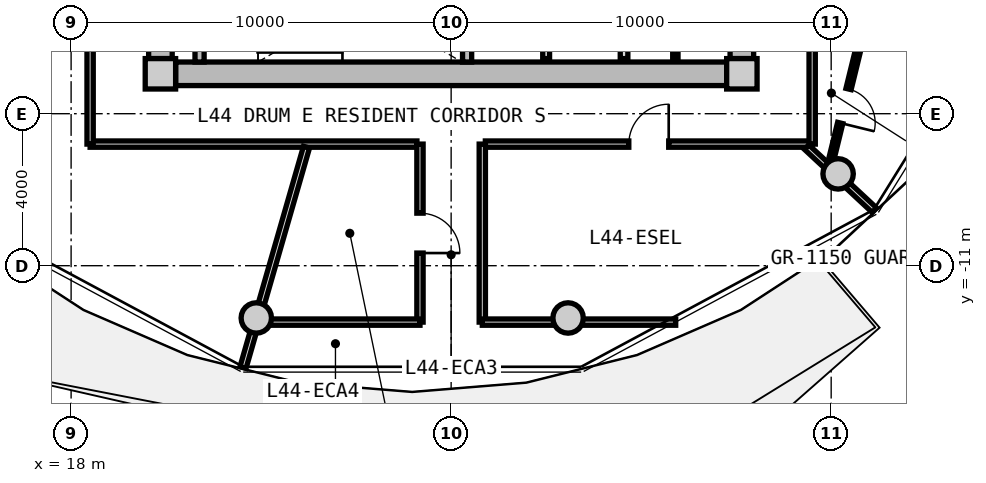
"""IFC4 building model, lengths in metres.
Left out: names, types, materials, properties, quantities, classifications, styles, units other than length and angle.
Written with IfcOpenShell. Run it as: python <this file> out.ifc"""

import sys

from ifc_helpers import new_model, si_unit, direction, frame, frame_2d, origin, origin_2d, place, context, subcontext, project, spatial, rectangle, circle, extrude, source, transform, mapped, element, fill, save


model = new_model("IFC4")
c1 = context("Model", 3, precision=1e-05, world=origin(), true_north=direction((0.0, 1.0)))
c2 = subcontext(c1, "Body", "Model", "MODEL_VIEW")
j1 = project(units=[si_unit("LENGTHUNIT", "METRE"), si_unit("PLANEANGLEUNIT", "RADIAN")], contexts=[c1])
p1 = place(None, origin())
s1 = spatial("IfcSite", under=j1, at=p1, CompositionType="ELEMENT")
p2 = place(p1, origin())
s2 = spatial("IfcBuilding", under=s1, at=p2, CompositionType="ELEMENT")
p3 = place(p2, frame((0.0, 0.0, 143.45)))
s3 = spatial("IfcBuildingStorey", under=s2, at=p3, CompositionType="ELEMENT", Elevation=143.45)
m1 = source(origin(), c2, "Body", "SweptSolid", [
    extrude(rectangle(XDim=0.8, YDim=0.8, at=origin_2d()), origin(), (0.0, 0.0, 1.0), 3.05),
])
for number, where, z_axis, x_axis in (
    (1, (20.35, -5.95, 0.0), (0.0, 0.0, 1.0), (1.0, 0.0, 0.0)),
    (2, (35.65, -5.95, 0.0), (0.0, 0.0, 1.0), (1.0, 0.0, 0.0)),
):
    element("IfcColumn", number, at=place(p3, frame(where, z_axis=z_axis, x_axis=x_axis)), inside=s3, PredefinedType="COLUMN", context=c2, shape_type="MappedRepresentation", body=[
        mapped(m1, transform((0.0, 0.0, 0.0), x_axis=(1.0, 0.0, 0.0), y_axis=(0.0, 1.0, 0.0), z_axis=(0.0, 0.0, 1.0), scale=1.0)),
    ])
m2 = source(origin(), c2, "Body", "SweptSolid", [
    extrude(rectangle(XDim=14.5, YDim=0.62, at=frame_2d((7.25, 0.0))), origin(), (0.0, 0.0, 1.0), 2.81),
])
p4 = place(p3, frame((35.25, -5.95, 0.0), z_axis=(0.0, 0.0, 1.0), x_axis=(-1.0, 0.0, 0.0)))
e3 = element("IfcWall", 3, at=p4, inside=s3, PredefinedType="SHEAR", context=c2, shape_type="MappedRepresentation", body=[
    mapped(m2, transform((0.0, 0.0, 0.0), x_axis=(1.0, 0.0, 0.0), y_axis=(0.0, 1.0, 0.0), z_axis=(0.0, 0.0, 1.0), scale=1.0)),
])
m3 = source(origin(), c2, "Body", "SweptSolid", [
    extrude(rectangle(XDim=11.1, YDim=0.62, at=frame_2d((5.55, 0.0))), origin(), (0.0, 0.0, 1.0), 2.81),
])
p5 = place(p3, frame((20.35, -5.55, 0.0), z_axis=(0.0, 0.0, 1.0), x_axis=(0.0, 1.0, 0.0)))
e4 = element("IfcWall", 4, at=p5, inside=s3, PredefinedType="SHEAR", context=c2, shape_type="MappedRepresentation", body=[
    mapped(m3, transform((0.0, 0.0, 0.0), x_axis=(1.0, 0.0, 0.0), y_axis=(0.0, 1.0, 0.0), z_axis=(0.0, 0.0, 1.0), scale=1.0)),
])
p6 = place(p5, frame((3.8, 0.0, 0.0)))
e5 = element("IfcOpeningElement", 5, at=p6, cuts=e4, PredefinedType="OPENING", context=c2, shape_type="SweptSolid", body=[
    extrude(rectangle(XDim=1.2, YDim=2.15, at=frame_2d((0.6, 1.075))), frame((0.0, 0.32, 0.0), z_axis=(0.0, -1.0, 0.0), x_axis=(1.0, 0.0, 0.0)), (0.0, 0.0, 1.0), 0.64),
])
p7 = place(p3, frame((35.65, 5.55, 0.0), z_axis=(0.0, 0.0, 1.0), x_axis=(0.0, -1.0, 0.0)))
e6 = element("IfcWall", 6, at=p7, inside=s3, PredefinedType="SHEAR", context=c2, shape_type="MappedRepresentation", body=[
    mapped(m3, transform((0.0, 0.0, 0.0), x_axis=(1.0, 0.0, 0.0), y_axis=(0.0, 1.0, 0.0), z_axis=(0.0, 0.0, 1.0), scale=1.0)),
])
p8 = place(p7, frame((5.65, 0.0, 0.0)))
e7 = element("IfcOpeningElement", 7, at=p8, cuts=e6, PredefinedType="OPENING", context=c2, shape_type="SweptSolid", body=[
    extrude(rectangle(XDim=1.2, YDim=2.15, at=frame_2d((0.6, 1.075))), frame((0.0, 0.32, 0.0), z_axis=(0.0, -1.0, 0.0), x_axis=(1.0, 0.0, 0.0)), (0.0, 0.0, 1.0), 0.64),
])
m4 = source(origin(), c2, "Body", "SweptSolid", [
    extrude(circle(Radius=0.4, at=origin_2d()), origin(), (0.0, 0.0, 1.0), 3.05),
])
for number, where, z_axis, x_axis in (
    (8, (22.873, -12.375, 0.0), (0.0, 0.0, 1.0), (1.0, 0.0, 0.0)),
    (9, (31.077, -12.375, 0.0), (0.0, 0.0, 1.0), (1.0, 0.0, 0.0)),
    (10, (38.183, -8.584, 0.0), (0.0, 0.0, 1.0), (1.0, 0.0, 0.0)),
):
    element("IfcColumn", number, at=place(p3, frame(where, z_axis=z_axis, x_axis=x_axis)), inside=s3, PredefinedType="COLUMN", context=c2, shape_type="MappedRepresentation", body=[
        mapped(m4, transform((0.0, 0.0, 0.0), x_axis=(1.0, 0.0, 0.0), y_axis=(0.0, 1.0, 0.0), z_axis=(0.0, 0.0, 1.0), scale=1.0)),
    ])
m5 = source(origin(), c2, "Body", "SweptSolid", [
    extrude(rectangle(XDim=3.19, YDim=0.24, at=frame_2d((1.595, 0.0))), origin(), (0.0, 0.0, 1.0), 2.81),
])
for number, where, z_axis, x_axis in (
    (11, (21.38, -5.64, 0.0), (0.0, 0.0, 1.0), (0.0, 1.0, 0.0)),
    (12, (28.42, -5.64, 0.0), (0.0, 0.0, 1.0), (0.0, 1.0, 0.0)),
):
    element("IfcWall", number, at=place(p3, frame(where, z_axis=z_axis, x_axis=x_axis)), inside=s3, PredefinedType="PARTITIONING", context=c2, shape_type="MappedRepresentation", body=[
        mapped(m5, transform((0.0, 0.0, 0.0), x_axis=(1.0, 0.0, 0.0), y_axis=(0.0, 1.0, 0.0), z_axis=(0.0, 0.0, 1.0), scale=1.0)),
    ])
m6 = source(origin(), c2, "Body", "SweptSolid", [
    extrude(rectangle(XDim=3.8, YDim=0.2, at=frame_2d((1.9, 0.0))), origin(), (0.0, 0.0, 1.0), 2.795),
])
p9 = place(p3, frame((32.55, -5.55, 0.0), z_axis=(0.0, 0.0, 1.0), x_axis=(0.0, 1.0, 0.0)))
e13 = element("IfcWall", 13, at=p9, inside=s3, PredefinedType="PARTITIONING", context=c2, shape_type="MappedRepresentation", body=[
    mapped(m6, transform((0.0, 0.0, 0.0), x_axis=(1.0, 0.0, 0.0), y_axis=(0.0, 1.0, 0.0), z_axis=(0.0, 0.0, 1.0), scale=1.0)),
])
m7 = source(origin(), c2, "Body", "SweptSolid", [
    extrude(rectangle(XDim=3.22, YDim=0.18, at=frame_2d((1.61, 0.0))), origin(), (0.0, 0.0, 1.0), 2.795),
])
p10 = place(p3, frame((30.5, -5.55, 0.0), z_axis=(0.0, 0.0, 1.0), x_axis=(0.0, 1.0, 0.0)))
e14 = element("IfcWall", 14, at=p10, inside=s3, PredefinedType="PARTITIONING", context=c2, shape_type="MappedRepresentation", body=[
    mapped(m7, transform((0.0, 0.0, 0.0), x_axis=(1.0, 0.0, 0.0), y_axis=(0.0, 1.0, 0.0), z_axis=(0.0, 0.0, 1.0), scale=1.0)),
])
m8 = source(origin(), c2, "Body", "SweptSolid", [
    extrude(rectangle(XDim=3.8, YDim=0.14, at=frame_2d((1.9, 0.0))), origin(), (0.0, 0.0, 1.0), 2.795),
])
p11 = place(p3, frame((33.9, -5.55, 0.0), z_axis=(0.0, 0.0, 1.0), x_axis=(0.0, 1.0, 0.0)))
e15 = element("IfcWall", 15, at=p11, inside=s3, PredefinedType="PARTITIONING", context=c2, shape_type="MappedRepresentation", body=[
    mapped(m8, transform((0.0, 0.0, 0.0), x_axis=(1.0, 0.0, 0.0), y_axis=(0.0, 1.0, 0.0), z_axis=(0.0, 0.0, 1.0), scale=1.0)),
])
m9 = source(origin(), c2, "Body", "SweptSolid", [
    extrude(rectangle(XDim=8.6, YDim=0.165, at=frame_2d((4.3, 0.0))), origin(), (0.0, 0.0, 1.0), 2.795),
])
p12 = place(p3, frame((37.5, -7.8, 0.0), z_axis=(0.0, 0.0, 1.0), x_axis=(-1.0, 0.0, 0.0)))
e16 = element("IfcWall", 16, at=p12, inside=s3, PredefinedType="PARTITIONING", context=c2, shape_type="MappedRepresentation", body=[
    mapped(m9, transform((0.0, 0.0, 0.0), x_axis=(1.0, 0.0, 0.0), y_axis=(0.0, 1.0, 0.0), z_axis=(0.0, 0.0, 1.0), scale=1.0)),
])
p13 = place(p12, frame((3.775, 0.0, 0.0)))
e17 = element("IfcOpeningElement", 17, at=p13, cuts=e16, PredefinedType="OPENING", context=c2, shape_type="SweptSolid", body=[
    extrude(rectangle(XDim=1.05, YDim=2.15, at=frame_2d((0.525, 1.075))), frame((0.0, 0.093, 0.0), z_axis=(0.0, -1.0, 0.0), x_axis=(1.0, 0.0, 0.0)), (0.0, 0.0, 1.0), 0.185),
])
p14 = place(p3, frame((27.1, -7.8, 0.0), z_axis=(0.0, 0.0, 1.0), x_axis=(-1.0, 0.0, 0.0)))
e18 = element("IfcWall", 18, at=p14, inside=s3, PredefinedType="PARTITIONING", context=c2, shape_type="MappedRepresentation", body=[
    mapped(m9, transform((0.0, 0.0, 0.0), x_axis=(1.0, 0.0, 0.0), y_axis=(0.0, 1.0, 0.0), z_axis=(0.0, 0.0, 1.0), scale=1.0)),
])
m10 = source(origin(), c2, "Body", "SweptSolid", [
    extrude(rectangle(XDim=15.6, YDim=0.165, at=frame_2d((7.8, 0.0))), origin(), (0.0, 0.0, 1.0), 2.795),
])
p15 = place(p3, frame((18.5, -7.8, 0.0), z_axis=(0.0, 0.0, 1.0), x_axis=(0.0, 1.0, 0.0)))
e19 = element("IfcWall", 19, at=p15, inside=s3, PredefinedType="PARTITIONING", context=c2, shape_type="MappedRepresentation", body=[
    mapped(m10, transform((0.0, 0.0, 0.0), x_axis=(1.0, 0.0, 0.0), y_axis=(0.0, 1.0, 0.0), z_axis=(0.0, 0.0, 1.0), scale=1.0)),
])
p16 = place(p15, frame((7.175, 0.0, 0.0)))
e20 = element("IfcOpeningElement", 20, at=p16, cuts=e19, PredefinedType="OPENING", context=c2, shape_type="SweptSolid", body=[
    extrude(rectangle(XDim=1.25, YDim=2.2, at=frame_2d((0.625, 1.1))), frame((0.0, 0.093, 0.0), z_axis=(0.0, -1.0, 0.0), x_axis=(1.0, 0.0, 0.0)), (0.0, 0.0, 1.0), 0.185),
])
p17 = place(p3, frame((37.5, 7.8, 0.0), z_axis=(0.0, 0.0, 1.0), x_axis=(0.0, -1.0, 0.0)))
e21 = element("IfcWall", 21, at=p17, inside=s3, PredefinedType="PARTITIONING", context=c2, shape_type="MappedRepresentation", body=[
    mapped(m10, transform((0.0, 0.0, 0.0), x_axis=(1.0, 0.0, 0.0), y_axis=(0.0, 1.0, 0.0), z_axis=(0.0, 0.0, 1.0), scale=1.0)),
])
p18 = place(p17, frame((5.687, 0.0, 0.0)))
e22 = element("IfcOpeningElement", 22, at=p18, cuts=e21, PredefinedType="OPENING", context=c2, shape_type="SweptSolid", body=[
    extrude(rectangle(XDim=1.05, YDim=2.15, at=frame_2d((0.525, 1.075))), frame((0.0, 0.093, 0.0), z_axis=(0.0, -1.0, 0.0), x_axis=(1.0, 0.0, 0.0)), (0.0, 0.0, 1.0), 0.185),
])
m11 = source(origin(), c2, "Body", "SweptSolid", [
    extrude(rectangle(XDim=6.035, YDim=0.165, at=frame_2d((3.018, 0.0))), origin(), (0.0, 0.0, 1.0), 2.435),
])
p19 = place(p3, frame((24.194, -7.88, 0.0), z_axis=(0.0, 0.0, 1.0), x_axis=(-0.276809454862, -0.960924828329, 0.0)))
e23 = element("IfcWall", 23, at=p19, inside=s3, PredefinedType="PARTITIONING", context=c2, shape_type="MappedRepresentation", body=[
    mapped(m11, transform((0.0, 0.0, 0.0), x_axis=(1.0, 0.0, 0.0), y_axis=(0.0, 1.0, 0.0), z_axis=(0.0, 0.0, 1.0), scale=1.0)),
])
m12 = source(origin(), c2, "Body", "SweptSolid", [
    extrude(rectangle(XDim=2.435, YDim=0.165, at=frame_2d((1.217, 0.0))), origin(), (0.0, 0.0, 1.0), 2.345),
])
p20 = place(p3, frame((37.354, -7.88, 0.0), z_axis=(0.0, 0.0, 1.0), x_axis=(0.732164643118, -0.681127693878, 0.0)))
e24 = element("IfcWall", 24, at=p20, inside=s3, PredefinedType="PARTITIONING", context=c2, shape_type="MappedRepresentation", body=[
    mapped(m12, transform((0.0, 0.0, 0.0), x_axis=(1.0, 0.0, 0.0), y_axis=(0.0, 1.0, 0.0), z_axis=(0.0, 0.0, 1.0), scale=1.0)),
])
m13 = source(origin(), c2, "Body", "SweptSolid", [
    extrude(rectangle(XDim=4.685, YDim=0.165, at=frame_2d((2.342, 0.0))), origin(), (0.0, 0.0, 1.0), 2.795),
])
p21 = place(p3, frame((27.18, -12.485, 0.0), z_axis=(0.0, 0.0, 1.0), x_axis=(0.0, 1.0, 0.0)))
e25 = element("IfcWall", 25, at=p21, inside=s3, PredefinedType="PARTITIONING", context=c2, shape_type="MappedRepresentation", body=[
    mapped(m13, transform((0.0, 0.0, 0.0), x_axis=(1.0, 0.0, 0.0), y_axis=(0.0, 1.0, 0.0), z_axis=(0.0, 0.0, 1.0), scale=1.0)),
])
p22 = place(p21, frame((1.817, 0.0, 0.0)))
e26 = element("IfcOpeningElement", 26, at=p22, cuts=e25, PredefinedType="OPENING", context=c2, shape_type="SweptSolid", body=[
    extrude(rectangle(XDim=1.05, YDim=2.15, at=frame_2d((0.525, 1.075))), frame((0.0, 0.093, 0.0), z_axis=(0.0, -1.0, 0.0), x_axis=(1.0, 0.0, 0.0)), (0.0, 0.0, 1.0), 0.185),
])
m14 = source(origin(), c2, "Body", "SweptSolid", [
    extrude(rectangle(XDim=4.469, YDim=0.165, at=frame_2d((2.234, 0.0))), origin(), (0.0, 0.0, 1.0), 2.345),
])
p23 = place(p3, frame((22.711, -12.485, 0.0), z_axis=(0.0, 0.0, 1.0), x_axis=(1.0, 0.0, 0.0)))
e27 = element("IfcWall", 27, at=p23, inside=s3, PredefinedType="PARTITIONING", context=c2, shape_type="MappedRepresentation", body=[
    mapped(m14, transform((0.0, 0.0, 0.0), x_axis=(1.0, 0.0, 0.0), y_axis=(0.0, 1.0, 0.0), z_axis=(0.0, 0.0, 1.0), scale=1.0)),
])
p24 = place(p3, frame((28.82, -12.485, 0.0), z_axis=(0.0, 0.0, 1.0), x_axis=(0.0, 1.0, 0.0)))
e28 = element("IfcWall", 28, at=p24, inside=s3, PredefinedType="PARTITIONING", context=c2, shape_type="MappedRepresentation", body=[
    mapped(m13, transform((0.0, 0.0, 0.0), x_axis=(1.0, 0.0, 0.0), y_axis=(0.0, 1.0, 0.0), z_axis=(0.0, 0.0, 1.0), scale=1.0)),
])
m15 = source(origin(), c2, "Body", "SweptSolid", [
    extrude(rectangle(XDim=5.089, YDim=0.165, at=frame_2d((2.544, 0.0))), origin(), (0.0, 0.0, 1.0), 2.345),
])
p25 = place(p3, frame((28.82, -12.485, 0.0), z_axis=(0.0, 0.0, 1.0), x_axis=(1.0, 0.0, 0.0)))
e29 = element("IfcWall", 29, at=p25, inside=s3, PredefinedType="PARTITIONING", context=c2, shape_type="MappedRepresentation", body=[
    mapped(m15, transform((0.0, 0.0, 0.0), x_axis=(1.0, 0.0, 0.0), y_axis=(0.0, 1.0, 0.0), z_axis=(0.0, 0.0, 1.0), scale=1.0)),
])
m16 = source(origin(), c2, "Body", "SweptSolid", [
    extrude(rectangle(XDim=3.464, YDim=0.14, at=frame_2d((1.732, 0.0))), origin(), (0.0, 0.0, 1.0), 2.795),
])
p26 = place(p3, frame((38.76, -5.115, 0.0), z_axis=(0.0, 0.0, 1.0), x_axis=(-0.238055968485, -0.971251438027, 0.0)))
e30 = element("IfcWall", 30, at=p26, inside=s3, PredefinedType="PARTITIONING", context=c2, shape_type="MappedRepresentation", body=[
    mapped(m16, transform((0.0, 0.0, 0.0), x_axis=(1.0, 0.0, 0.0), y_axis=(0.0, 1.0, 0.0), z_axis=(0.0, 0.0, 1.0), scale=1.0)),
])
p27 = place(p26, frame((1.272, 0.0, 0.0)))
e31 = element("IfcOpeningElement", 31, at=p27, cuts=e30, PredefinedType="OPENING", context=c2, shape_type="SweptSolid", body=[
    extrude(rectangle(XDim=0.92, YDim=2.1, at=frame_2d((0.46, 1.05))), frame((0.0, 0.08, 0.0), z_axis=(0.0, -1.0, 0.0), x_axis=(1.0, 0.0, 0.0)), (0.0, 0.0, 1.0), 0.16),
])
m17 = source(origin(), c2, "Body", "SweptSolid", [
    extrude(rectangle(XDim=1.957, YDim=0.115, at=frame_2d((0.979, 0.0))), origin(), (0.0, 0.0, 1.0), 2.795),
])
p28 = place(p3, frame((39.623, -5.057, 0.0), z_axis=(0.0, 0.0, 1.0), x_axis=(0.889228358674, -0.45746357902, 0.0)))
e32 = element("IfcWall", 32, at=p28, inside=s3, PredefinedType="PARTITIONING", context=c2, shape_type="MappedRepresentation", body=[
    mapped(m17, transform((0.0, 0.0, 0.0), x_axis=(1.0, 0.0, 0.0), y_axis=(0.0, 1.0, 0.0), z_axis=(0.0, 0.0, 1.0), scale=1.0)),
])
m18 = source(origin(), c2, "Body", "SweptSolid", [
    extrude(rectangle(XDim=1.05, YDim=2.15, at=frame_2d((0.525, 1.075))), frame((0.0, 0.025, 0.0), z_axis=(0.0, -1.0, 0.0), x_axis=(1.0, 0.0, 0.0)), (0.0, 0.0, 1.0), 0.05),
])
p29 = place(p22, frame((1.05, 0.0, 0.0), z_axis=(0.0, 0.0, 1.0), x_axis=(-1.0, 0.0, 0.0)))
e33 = element("IfcDoor", 33, at=p29, inside=s3, OperationType="SINGLE_SWING_RIGHT", PredefinedType="DOOR", context=c2, shape_type="MappedRepresentation", body=[
    mapped(m18, transform((0.0, 0.0, 0.0), x_axis=(1.0, 0.0, 0.0), y_axis=(0.0, 1.0, 0.0), z_axis=(0.0, 0.0, 1.0), scale=1.0)),
])
fill(e26, e33)
p30 = place(p13, frame((1.05, 0.0, 0.0), z_axis=(0.0, 0.0, 1.0), x_axis=(-1.0, 0.0, 0.0)))
e34 = element("IfcDoor", 34, at=p30, inside=s3, OperationType="SINGLE_SWING_RIGHT", PredefinedType="DOOR", context=c2, shape_type="MappedRepresentation", body=[
    mapped(m18, transform((0.0, 0.0, 0.0), x_axis=(1.0, 0.0, 0.0), y_axis=(0.0, 1.0, 0.0), z_axis=(0.0, 0.0, 1.0), scale=1.0)),
])
fill(e17, e34)
m19 = source(origin(), c2, "Body", "SweptSolid", [
    extrude(rectangle(XDim=0.92, YDim=2.1, at=frame_2d((0.46, 1.05))), frame((0.0, 0.025, 0.0), z_axis=(0.0, -1.0, 0.0), x_axis=(1.0, 0.0, 0.0)), (0.0, 0.0, 1.0), 0.05),
])
p31 = place(p27, origin())
e35 = element("IfcDoor", 35, at=p31, inside=s3, OperationType="SINGLE_SWING_RIGHT", PredefinedType="DOOR", context=c2, shape_type="MappedRepresentation", body=[
    mapped(m19, transform((0.0, 0.0, 0.0), x_axis=(1.0, 0.0, 0.0), y_axis=(0.0, 1.0, 0.0), z_axis=(0.0, 0.0, 1.0), scale=1.0)),
])
fill(e31, e35)
save(model, sys.argv[1])
